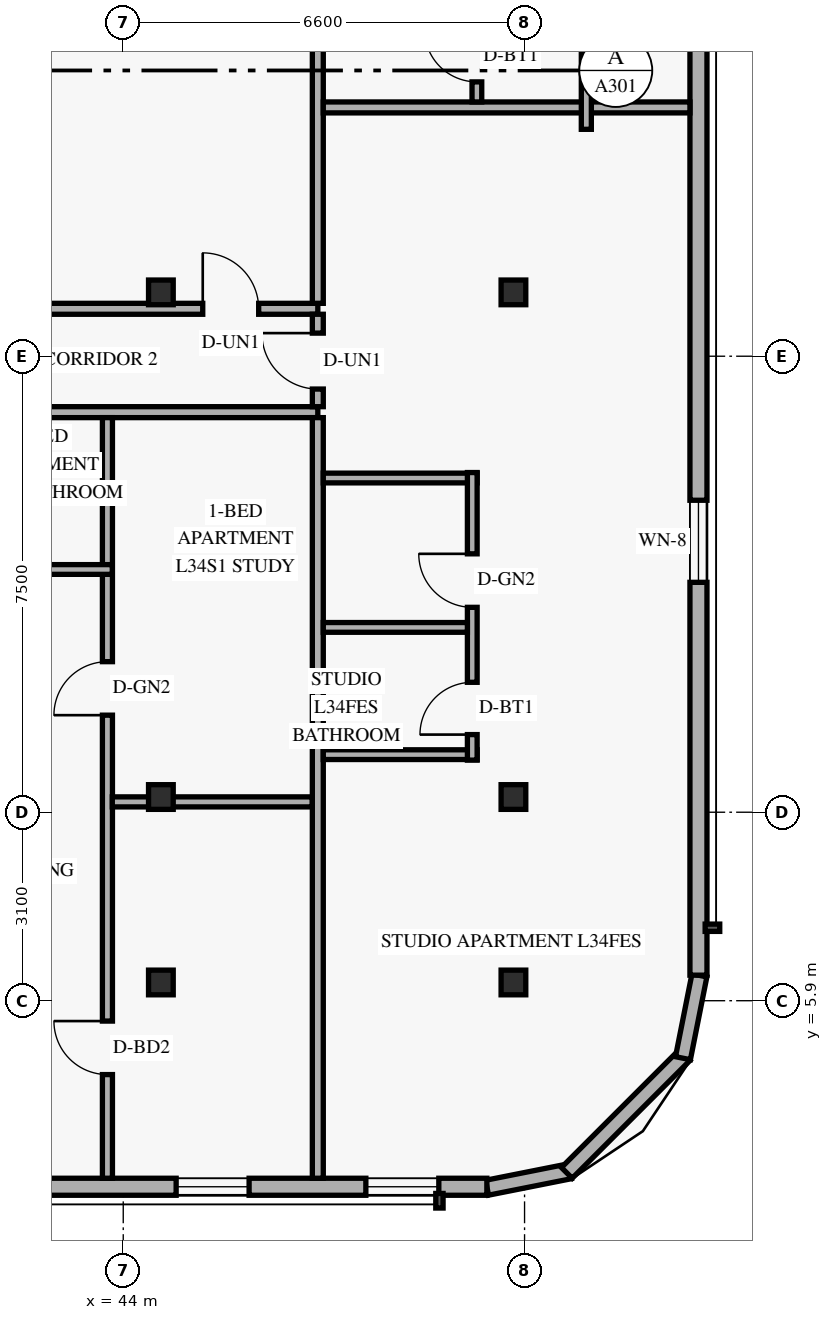
"""IFC4 building model, lengths in metres.
Left out: names, types, materials, properties, quantities, classifications, styles, units other than length and angle.
Written with IfcOpenShell. Run it as: python <this file> out.ifc"""

import sys

from ifc_helpers import new_model, si_unit, direction, frame, frame_2d, origin, origin_2d, place, context, subcontext, project, spatial, rectangle, hollow_rectangle, extrude, element, fill, save


model = new_model("IFC4")
c1 = context("Model", 3, precision=1e-05, world=origin(), true_north=direction((0.0, 1.0)))
c2 = subcontext(c1, "Body", "Model", "MODEL_VIEW")
j1 = project(units=[si_unit("LENGTHUNIT", "METRE"), si_unit("PLANEANGLEUNIT", "RADIAN")], contexts=[c1])
p1 = place(None, origin())
s1 = spatial("IfcSite", under=j1, at=p1, CompositionType="ELEMENT")
p2 = place(p1, origin())
s2 = spatial("IfcBuilding", under=s1, at=p2, CompositionType="ELEMENT")
p3 = place(p2, frame((0.0, 0.0, 132.0)))
s3 = spatial("IfcBuildingStorey", under=s2, at=p3, CompositionType="ELEMENT", Elevation=132.0)
for number, where, z_axis, x_axis in (
    (1, (44.556, 6.2, 0.0), (0.035, 0.0, 0.999), (0.0, 1.0, 0.0)),
    (2, (44.556, 9.25, 0.0), (0.035, 0.0, 0.999), (0.0, 1.0, 0.0)),
    (3, (44.556, 17.55, 0.0), (0.035, 0.0, 0.999), (0.0, 1.0, 0.0)),
):
    element("IfcColumn", number, at=place(p3, frame(where, z_axis=z_axis, x_axis=x_axis)), inside=s3, PredefinedType="COLUMN", context=c2, shape_type="SweptSolid", body=[
        extrude(hollow_rectangle(XDim=0.406, YDim=0.406, WallThickness=0.016, at=origin_2d()), origin(), (0.0, 0.0, 1.0), 3.602),
    ])
for number, where, z_axis, x_axis in (
    (4, (50.313, 6.2, 0.0), (0.058, 0.0, 0.998), (0.0, 1.0, 0.0)),
    (5, (50.313, 9.25, 0.0), (0.058, 0.0, 0.998), (0.0, 1.0, 0.0)),
    (6, (50.313, 17.55, 0.0), (0.058, 0.0, 0.998), (0.0, 1.0, 0.0)),
):
    element("IfcColumn", number, at=place(p3, frame(where, z_axis=z_axis, x_axis=x_axis)), inside=s3, PredefinedType="COLUMN", context=c2, shape_type="SweptSolid", body=[
        extrude(hollow_rectangle(XDim=0.406, YDim=0.406, WallThickness=0.016, at=origin_2d()), origin(), (0.0, 0.0, 1.0), 3.606),
    ])
p4 = place(p3, frame((49.983, 2.824, 0.0), z_axis=(0.0, 0.0, 1.0), x_axis=(0.980809899341, 0.19496651342, 0.0)))
e7 = element("IfcWall", 7, at=p4, inside=s3, PredefinedType="SOLIDWALL", context=c2, shape_type="SweptSolid", body=[
    extrude(rectangle(XDim=1.389, YDim=0.25, at=frame_2d((0.694, 0.0))), origin(), (0.0, 0.0, 1.0), 3.3),
])
p5 = place(p3, frame((51.295, 3.068, 0.0), z_axis=(0.0, 0.0, 1.0), x_axis=(0.707151344399, 0.707062215165, 0.0)))
e8 = element("IfcWall", 8, at=p5, inside=s3, PredefinedType="SOLIDWALL", context=c2, shape_type="SweptSolid", body=[
    extrude(rectangle(XDim=2.739, YDim=0.25, at=frame_2d((1.37, 0.0))), origin(), (0.0, 0.0, 1.0), 3.3),
])
p6 = place(p3, frame((53.205, 4.955, 0.0), z_axis=(0.0, 0.0, 1.0), x_axis=(0.195000137217, 0.980803214965, 0.0)))
e9 = element("IfcWall", 9, at=p6, inside=s3, PredefinedType="SOLIDWALL", context=c2, shape_type="SweptSolid", body=[
    extrude(rectangle(XDim=1.388, YDim=0.25, at=frame_2d((0.694, 0.0))), origin(), (0.0, 0.0, 1.0), 3.3),
])
p7 = place(p3, frame((13.42, 2.84, 0.0), z_axis=(0.0, 0.0, 1.0), x_axis=(1.0, 0.0, 0.0)))
e10 = element("IfcWall", 10, at=p7, inside=s3, PredefinedType="SOLIDWALL", context=c2, shape_type="SweptSolid", body=[
    extrude(rectangle(XDim=36.56, YDim=0.28, at=frame_2d((18.28, 0.0))), origin(), (0.0, 0.0, 1.0), 3.3),
])
p8 = place(p7, frame((4.145, 0.0, 0.85)))
e11 = element("IfcOpeningElement", 11, at=p8, cuts=e10, PredefinedType="OPENING", context=c2, shape_type="SweptSolid", body=[
    extrude(rectangle(XDim=1.2, YDim=1.5, at=frame_2d((0.6, 0.75))), frame((0.0, 0.15, 0.0), z_axis=(0.0, -1.0, 0.0), x_axis=(1.0, 0.0, 0.0)), (0.0, 0.0, 1.0), 0.3),
])
p9 = place(p7, frame((10.005, 0.0, 0.85)))
e12 = element("IfcOpeningElement", 12, at=p9, cuts=e10, PredefinedType="OPENING", context=c2, shape_type="SweptSolid", body=[
    extrude(rectangle(XDim=1.2, YDim=1.5, at=frame_2d((0.6, 0.75))), frame((0.0, 0.15, 0.0), z_axis=(0.0, -1.0, 0.0), x_axis=(1.0, 0.0, 0.0)), (0.0, 0.0, 1.0), 0.3),
])
p10 = place(p7, frame((16.89, 0.0, 0.85)))
e13 = element("IfcOpeningElement", 13, at=p10, cuts=e10, PredefinedType="OPENING", context=c2, shape_type="SweptSolid", body=[
    extrude(rectangle(XDim=1.2, YDim=1.5, at=frame_2d((0.6, 0.75))), frame((0.0, 0.15, 0.0), z_axis=(0.0, -1.0, 0.0), x_axis=(1.0, 0.0, 0.0)), (0.0, 0.0, 1.0), 0.3),
])
p11 = place(p7, frame((22.465, 0.0, 0.85)))
e14 = element("IfcOpeningElement", 14, at=p11, cuts=e10, PredefinedType="OPENING", context=c2, shape_type="SweptSolid", body=[
    extrude(rectangle(XDim=1.2, YDim=1.5, at=frame_2d((0.6, 0.75))), frame((0.0, 0.15, 0.0), z_axis=(0.0, -1.0, 0.0), x_axis=(1.0, 0.0, 0.0)), (0.0, 0.0, 1.0), 0.3),
])
p12 = place(p7, frame((26.625, 0.0, 0.85)))
e15 = element("IfcOpeningElement", 15, at=p12, cuts=e10, PredefinedType="OPENING", context=c2, shape_type="SweptSolid", body=[
    extrude(rectangle(XDim=1.2, YDim=1.5, at=frame_2d((0.6, 0.75))), frame((0.0, 0.15, 0.0), z_axis=(0.0, -1.0, 0.0), x_axis=(1.0, 0.0, 0.0)), (0.0, 0.0, 1.0), 0.3),
])
p13 = place(p7, frame((31.45, 0.0, 0.85)))
e16 = element("IfcOpeningElement", 16, at=p13, cuts=e10, PredefinedType="OPENING", context=c2, shape_type="SweptSolid", body=[
    extrude(rectangle(XDim=1.2, YDim=1.5, at=frame_2d((0.6, 0.75))), frame((0.0, 0.15, 0.0), z_axis=(0.0, -1.0, 0.0), x_axis=(1.0, 0.0, 0.0)), (0.0, 0.0, 1.0), 0.3),
])
p14 = place(p7, frame((34.57, 0.0, 0.85)))
e17 = element("IfcOpeningElement", 17, at=p14, cuts=e10, PredefinedType="OPENING", context=c2, shape_type="SweptSolid", body=[
    extrude(rectangle(XDim=1.2, YDim=1.5, at=frame_2d((0.6, 0.75))), frame((0.0, 0.15, 0.0), z_axis=(0.0, -1.0, 0.0), x_axis=(1.0, 0.0, 0.0)), (0.0, 0.0, 1.0), 0.3),
])
p15 = place(p3, frame((53.46, 6.32, 0.0), z_axis=(0.0, 0.0, 1.0), x_axis=(0.0, 1.0, 0.0)))
e18 = element("IfcWall", 18, at=p15, inside=s3, PredefinedType="SOLIDWALL", context=c2, shape_type="SweptSolid", body=[
    extrude(rectangle(XDim=35.36, YDim=0.28, at=frame_2d((17.68, 0.0))), origin(), (0.0, 0.0, 1.0), 3.3),
])
p16 = place(p15, frame((6.461, 0.0, 0.85)))
e19 = element("IfcOpeningElement", 19, at=p16, cuts=e18, PredefinedType="OPENING", context=c2, shape_type="SweptSolid", body=[
    extrude(rectangle(XDim=1.35, YDim=1.55, at=frame_2d((0.675, 0.775))), frame((0.0, 0.15, 0.0), z_axis=(0.0, -1.0, 0.0), x_axis=(1.0, 0.0, 0.0)), (0.0, 0.0, 1.0), 0.3),
])
p17 = place(p15, frame((16.542, 0.0, 0.85)))
e20 = element("IfcOpeningElement", 20, at=p17, cuts=e18, PredefinedType="OPENING", context=c2, shape_type="SweptSolid", body=[
    extrude(rectangle(XDim=1.35, YDim=1.55, at=frame_2d((0.675, 0.775))), frame((0.0, 0.15, 0.0), z_axis=(0.0, -1.0, 0.0), x_axis=(1.0, 0.0, 0.0)), (0.0, 0.0, 1.0), 0.3),
])
p18 = place(p15, frame((27.086, 0.0, 0.85)))
e21 = element("IfcOpeningElement", 21, at=p18, cuts=e18, PredefinedType="OPENING", context=c2, shape_type="SweptSolid", body=[
    extrude(rectangle(XDim=1.35, YDim=1.55, at=frame_2d((0.675, 0.775))), frame((0.0, 0.15, 0.0), z_axis=(0.0, -1.0, 0.0), x_axis=(1.0, 0.0, 0.0)), (0.0, 0.0, 1.0), 0.3),
])
p19 = place(p3, frame((37.633, 15.58, 0.0), z_axis=(0.0, 0.0, 1.0), x_axis=(1.0, 0.0, 0.0)))
e22 = element("IfcWall", 22, at=p19, inside=s3, PredefinedType="STANDARD", context=c2, shape_type="SweptSolid", body=[
    extrude(rectangle(XDim=9.567, YDim=0.18, at=frame_2d((4.784, 0.0))), origin(), (0.0, 0.0, 1.0), 2.671),
])
p20 = place(p19, frame((0.327, 0.0, 0.0)))
e23 = element("IfcOpeningElement", 23, at=p20, cuts=e22, PredefinedType="OPENING", context=c2, shape_type="SweptSolid", body=[
    extrude(rectangle(XDim=0.92, YDim=2.15, at=frame_2d((0.46, 1.075))), frame((0.0, 0.1, 0.0), z_axis=(0.0, -1.0, 0.0), x_axis=(1.0, 0.0, 0.0)), (0.0, 0.0, 1.0), 0.2),
])
p21 = place(p3, frame((37.64, 17.28, 0.0), z_axis=(0.0, 0.0, 1.0), x_axis=(1.0, 0.0, 0.0)))
e24 = element("IfcWall", 24, at=p21, inside=s3, PredefinedType="STANDARD", context=c2, shape_type="SweptSolid", body=[
    extrude(rectangle(XDim=9.56, YDim=0.18, at=frame_2d((4.78, 0.0))), origin(), (0.0, 0.0, 1.0), 2.671),
])
p22 = place(p21, frame((7.667, 0.0, 0.0)))
e25 = element("IfcOpeningElement", 25, at=p22, cuts=e24, PredefinedType="OPENING", context=c2, shape_type="SweptSolid", body=[
    extrude(rectangle(XDim=0.92, YDim=2.15, at=frame_2d((0.46, 1.075))), frame((0.0, 0.1, 0.0), z_axis=(0.0, -1.0, 0.0), x_axis=(1.0, 0.0, 0.0)), (0.0, 0.0, 1.0), 0.2),
])
p23 = place(p3, frame((43.74, 2.98, 0.0), z_axis=(0.0, 0.0, 1.0), x_axis=(0.0, 1.0, 0.0)))
e26 = element("IfcWall", 26, at=p23, inside=s3, PredefinedType="PARTITIONING", context=c2, shape_type="SweptSolid", body=[
    extrude(rectangle(XDim=12.51, YDim=0.165, at=frame_2d((6.255, 0.0))), origin(), (0.0, 0.0, 1.0), 2.671),
])
p24 = place(p23, frame((1.705, 0.0, 0.0)))
e27 = element("IfcOpeningElement", 27, at=p24, cuts=e26, PredefinedType="OPENING", context=c2, shape_type="SweptSolid", body=[
    extrude(rectangle(XDim=0.88, YDim=2.14, at=frame_2d((0.44, 1.07))), frame((0.0, 0.093, 0.0), z_axis=(0.0, -1.0, 0.0), x_axis=(1.0, 0.0, 0.0)), (0.0, 0.0, 1.0), 0.185),
])
p25 = place(p23, frame((7.616, 0.0, 0.0)))
e28 = element("IfcOpeningElement", 28, at=p25, cuts=e26, PredefinedType="OPENING", context=c2, shape_type="SweptSolid", body=[
    extrude(rectangle(XDim=0.88, YDim=2.12, at=frame_2d((0.44, 1.06))), frame((0.0, 0.093, 0.0), z_axis=(0.0, -1.0, 0.0), x_axis=(1.0, 0.0, 0.0)), (0.0, 0.0, 1.0), 0.185),
])
p26 = place(p3, frame((39.11, 12.992, 0.0), z_axis=(0.0, 0.0, 1.0), x_axis=(1.0, 0.0, 0.0)))
e29 = element("IfcWall", 29, at=p26, inside=s3, PredefinedType="PLUMBINGWALL", context=c2, shape_type="SweptSolid", body=[
    extrude(rectangle(XDim=4.71, YDim=0.16, at=frame_2d((2.355, 0.0))), origin(), (0.0, 0.0, 1.0), 3.3),
])
p27 = place(p26, frame((0.38, 0.0, 0.0)))
e30 = element("IfcOpeningElement", 30, at=p27, cuts=e29, PredefinedType="OPENING", context=c2, shape_type="SweptSolid", body=[
    extrude(rectangle(XDim=0.88, YDim=2.12, at=frame_2d((0.44, 1.06))), frame((0.0, 0.09, 0.0), z_axis=(0.0, -1.0, 0.0), x_axis=(1.0, 0.0, 0.0)), (0.0, 0.0, 1.0), 0.18),
])
p28 = place(p26, frame((2.786, 0.0, 0.0)))
e31 = element("IfcOpeningElement", 31, at=p28, cuts=e29, PredefinedType="OPENING", context=c2, shape_type="SweptSolid", body=[
    extrude(rectangle(XDim=0.86, YDim=2.12, at=frame_2d((0.43, 1.06))), frame((0.0, 0.09, 0.0), z_axis=(0.0, -1.0, 0.0), x_axis=(1.0, 0.0, 0.0)), (0.0, 0.0, 1.0), 0.18),
])
p29 = place(p3, frame((43.82, 9.17, 0.0), z_axis=(0.0, 0.0, 1.0), x_axis=(1.0, 0.0, 0.0)))
e32 = element("IfcWall", 32, at=p29, inside=s3, PredefinedType="PARTITIONING", context=c2, shape_type="SweptSolid", body=[
    extrude(rectangle(XDim=3.29, YDim=0.165, at=frame_2d((1.645, 0.0))), origin(), (0.0, 0.0, 1.0), 2.671),
])
p30 = place(p3, frame((47.2, 15.67, 0.0), z_axis=(0.0, 0.0, 1.0), x_axis=(0.0, 1.0, 0.0)))
e33 = element("IfcWall", 33, at=p30, inside=s3, PredefinedType="STANDARD", context=c2, shape_type="SweptSolid", body=[
    extrude(rectangle(XDim=1.52, YDim=0.18, at=frame_2d((0.76, 0.0))), origin(), (0.0, 0.0, 1.0), 3.3),
])
p31 = place(p30, frame((0.29, 0.0, 0.0)))
e34 = element("IfcOpeningElement", 34, at=p31, cuts=e33, PredefinedType="OPENING", context=c2, shape_type="SweptSolid", body=[
    extrude(rectangle(XDim=0.92, YDim=2.15, at=frame_2d((0.46, 1.075))), frame((0.0, 0.1, 0.0), z_axis=(0.0, -1.0, 0.0), x_axis=(1.0, 0.0, 0.0)), (0.0, 0.0, 1.0), 0.2),
])
p32 = place(p3, frame((47.2, 2.98, 0.0), z_axis=(0.0, 0.0, 1.0), x_axis=(0.0, 1.0, 0.0)))
e35 = element("IfcWall", 35, at=p32, inside=s3, PredefinedType="PARTITIONING", context=c2, shape_type="SweptSolid", body=[
    extrude(rectangle(XDim=12.51, YDim=0.18, at=frame_2d((6.255, 0.0))), origin(), (0.0, 0.0, 1.0), 2.671),
])
p33 = place(p3, frame((47.2, 17.37, 0.0), z_axis=(0.0, 0.0, 1.0), x_axis=(0.0, 1.0, 0.0)))
e36 = element("IfcWall", 36, at=p33, inside=s3, PredefinedType="PARTITIONING", context=c2, shape_type="SweptSolid", body=[
    extrude(rectangle(XDim=10.1, YDim=0.18, at=frame_2d((5.05, 0.0))), origin(), (0.0, 0.0, 1.0), 2.671),
])
p34 = place(p3, frame((47.29, 20.592, 0.0), z_axis=(0.0, 0.0, 1.0), x_axis=(1.0, 0.0, 0.0)))
e37 = element("IfcWall", 37, at=p34, inside=s3, PredefinedType="PARTITIONING", context=c2, shape_type="SweptSolid", body=[
    extrude(rectangle(XDim=6.03, YDim=0.18, at=frame_2d((3.015, 0.0))), origin(), (0.0, 0.0, 1.0), 2.749),
])
for number, where, z_axis, x_axis in (
    (38, (47.29, 9.947, 0.0), (0.0, 0.0, 1.0), (1.0, 0.0, 0.0)),
    (39, (47.29, 14.497, 0.0), (0.0, 0.0, 1.0), (1.0, 0.0, 0.0)),
):
    element("IfcWall", number, at=place(p3, frame(where, z_axis=z_axis, x_axis=x_axis)), inside=s3, PredefinedType="PLUMBINGWALL", context=c2, shape_type="SweptSolid", body=[
        extrude(rectangle(XDim=2.53, YDim=0.16, at=frame_2d((1.265, 0.0))), origin(), (0.0, 0.0, 1.0), 3.3),
    ])
p35 = place(p3, frame((49.74, 9.857, 0.0), z_axis=(0.0, 0.0, 1.0), x_axis=(0.0, 1.0, 0.0)))
e40 = element("IfcWall", 40, at=p35, inside=s3, PredefinedType="PLUMBINGWALL", context=c2, shape_type="SweptSolid", body=[
    extrude(rectangle(XDim=4.73, YDim=0.16, at=frame_2d((2.365, 0.0))), origin(), (0.0, 0.0, 1.0), 2.928),
])
p36 = place(p35, frame((0.42, 0.0, 0.0)))
e41 = element("IfcOpeningElement", 41, at=p36, cuts=e40, PredefinedType="OPENING", context=c2, shape_type="SweptSolid", body=[
    extrude(rectangle(XDim=0.86, YDim=2.12, at=frame_2d((0.43, 1.06))), frame((0.0, 0.09, 0.0), z_axis=(0.0, -1.0, 0.0), x_axis=(1.0, 0.0, 0.0)), (0.0, 0.0, 1.0), 0.18),
])
p37 = place(p35, frame((2.513, 0.0, 0.0)))
e42 = element("IfcOpeningElement", 42, at=p37, cuts=e40, PredefinedType="OPENING", context=c2, shape_type="SweptSolid", body=[
    extrude(rectangle(XDim=0.88, YDim=2.12, at=frame_2d((0.44, 1.06))), frame((0.0, 0.09, 0.0), z_axis=(0.0, -1.0, 0.0), x_axis=(1.0, 0.0, 0.0)), (0.0, 0.0, 1.0), 0.18),
])
p38 = place(p3, frame((47.29, 12.04, 0.0), z_axis=(0.0, 0.0, 1.0), x_axis=(1.0, 0.0, 0.0)))
e43 = element("IfcWall", 43, at=p38, inside=s3, PredefinedType="PLUMBINGWALL", context=c2, shape_type="SweptSolid", body=[
    extrude(rectangle(XDim=2.37, YDim=0.16, at=frame_2d((1.185, 0.0))), origin(), (0.0, 0.0, 1.0), 3.3),
])
p39 = place(p3, frame((49.816, 20.682, 0.0), z_axis=(0.0, 0.0, 1.0), x_axis=(0.0, 1.0, 0.0)))
e44 = element("IfcWall", 44, at=p39, inside=s3, PredefinedType="PLUMBINGWALL", context=c2, shape_type="SweptSolid", body=[
    extrude(rectangle(XDim=4.64, YDim=0.16, at=frame_2d((2.32, 0.0))), origin(), (0.0, 0.0, 1.0), 3.3),
])
p40 = place(p39, frame((0.33, 0.0, 0.0)))
e45 = element("IfcOpeningElement", 45, at=p40, cuts=e44, PredefinedType="OPENING", context=c2, shape_type="SweptSolid", body=[
    extrude(rectangle(XDim=0.86, YDim=2.12, at=frame_2d((0.43, 1.06))), frame((0.0, 0.09, 0.0), z_axis=(0.0, -1.0, 0.0), x_axis=(1.0, 0.0, 0.0)), (0.0, 0.0, 1.0), 0.18),
])
p41 = place(p39, frame((2.423, 0.0, 0.0)))
e46 = element("IfcOpeningElement", 46, at=p41, cuts=e44, PredefinedType="OPENING", context=c2, shape_type="SweptSolid", body=[
    extrude(rectangle(XDim=0.88, YDim=2.12, at=frame_2d((0.44, 1.06))), frame((0.0, 0.09, 0.0), z_axis=(0.0, -1.0, 0.0), x_axis=(1.0, 0.0, 0.0)), (0.0, 0.0, 1.0), 0.18),
])
p42 = place(p3, frame((51.616, 20.232, 0.0), z_axis=(0.0, 0.0, 1.0), x_axis=(0.0, 1.0, 0.0)))
e47 = element("IfcWall", 47, at=p42, inside=s3, PredefinedType="PARTITIONING", context=c2, shape_type="SweptSolid", body=[
    extrude(rectangle(XDim=6.25, YDim=0.165, at=frame_2d((3.125, 0.0))), origin(), (0.0, 0.0, 1.0), 3.3),
])
p43 = place(p13, origin())
e48 = element("IfcWindow", 48, at=p43, inside=s3, PartitioningType="SINGLE_PANEL", PredefinedType="WINDOW", context=c2, shape_type="SweptSolid", body=[
    extrude(rectangle(XDim=1.2, YDim=1.5, at=frame_2d((0.6, 0.75))), frame((0.0, 0.03, 0.0), z_axis=(0.0, -1.0, 0.0), x_axis=(1.0, 0.0, 0.0)), (0.0, 0.0, 1.0), 0.06),
])
fill(e16, e48)
p44 = place(p14, origin())
e49 = element("IfcWindow", 49, at=p44, inside=s3, PartitioningType="SINGLE_PANEL", PredefinedType="WINDOW", context=c2, shape_type="SweptSolid", body=[
    extrude(rectangle(XDim=1.2, YDim=1.5, at=frame_2d((0.6, 0.75))), frame((0.0, 0.03, 0.0), z_axis=(0.0, -1.0, 0.0), x_axis=(1.0, 0.0, 0.0)), (0.0, 0.0, 1.0), 0.06),
])
fill(e17, e49)
p45 = place(p16, origin())
e50 = element("IfcWindow", 50, at=p45, inside=s3, PartitioningType="SINGLE_PANEL", PredefinedType="WINDOW", context=c2, shape_type="SweptSolid", body=[
    extrude(rectangle(XDim=1.35, YDim=1.55, at=frame_2d((0.675, 0.775))), frame((0.0, 0.03, 0.0), z_axis=(0.0, -1.0, 0.0), x_axis=(1.0, 0.0, 0.0)), (0.0, 0.0, 1.0), 0.06),
])
fill(e19, e50)
p46 = place(p24, origin())
e51 = element("IfcDoor", 51, at=p46, inside=s3, OperationType="SINGLE_SWING_RIGHT", PredefinedType="DOOR", context=c2, shape_type="SweptSolid", body=[
    extrude(rectangle(XDim=0.88, YDim=2.14, at=frame_2d((0.44, 1.07))), frame((0.0, 0.025, 0.0), z_axis=(0.0, -1.0, 0.0), x_axis=(1.0, 0.0, 0.0)), (0.0, 0.0, 1.0), 0.05),
])
fill(e27, e51)
p47 = place(p25, origin())
e52 = element("IfcDoor", 52, at=p47, inside=s3, OperationType="SINGLE_SWING_LEFT", PredefinedType="DOOR", context=c2, shape_type="SweptSolid", body=[
    extrude(rectangle(XDim=0.88, YDim=2.12, at=frame_2d((0.44, 1.06))), frame((0.0, 0.025, 0.0), z_axis=(0.0, -1.0, 0.0), x_axis=(1.0, 0.0, 0.0)), (0.0, 0.0, 1.0), 0.05),
])
fill(e28, e52)
p48 = place(p22, origin())
e53 = element("IfcDoor", 53, at=p48, inside=s3, OperationType="SINGLE_SWING_LEFT", PredefinedType="DOOR", context=c2, shape_type="SweptSolid", body=[
    extrude(rectangle(XDim=0.92, YDim=2.15, at=frame_2d((0.46, 1.075))), frame((0.0, 0.025, 0.0), z_axis=(0.0, -1.0, 0.0), x_axis=(1.0, 0.0, 0.0)), (0.0, 0.0, 1.0), 0.05),
])
fill(e25, e53)
p49 = place(p31, origin())
e54 = element("IfcDoor", 54, at=p49, inside=s3, OperationType="SINGLE_SWING_RIGHT", PredefinedType="DOOR", context=c2, shape_type="SweptSolid", body=[
    extrude(rectangle(XDim=0.92, YDim=2.15, at=frame_2d((0.46, 1.075))), frame((0.0, 0.025, 0.0), z_axis=(0.0, -1.0, 0.0), x_axis=(1.0, 0.0, 0.0)), (0.0, 0.0, 1.0), 0.05),
])
fill(e34, e54)
p50 = place(p36, origin())
e55 = element("IfcDoor", 55, at=p50, inside=s3, OperationType="SINGLE_SWING_LEFT", PredefinedType="DOOR", context=c2, shape_type="SweptSolid", body=[
    extrude(rectangle(XDim=0.86, YDim=2.12, at=frame_2d((0.43, 1.06))), frame((0.0, 0.025, 0.0), z_axis=(0.0, -1.0, 0.0), x_axis=(1.0, 0.0, 0.0)), (0.0, 0.0, 1.0), 0.05),
])
fill(e41, e55)
p51 = place(p37, origin())
e56 = element("IfcDoor", 56, at=p51, inside=s3, OperationType="SINGLE_SWING_RIGHT", PredefinedType="DOOR", context=c2, shape_type="SweptSolid", body=[
    extrude(rectangle(XDim=0.88, YDim=2.12, at=frame_2d((0.44, 1.06))), frame((0.0, 0.025, 0.0), z_axis=(0.0, -1.0, 0.0), x_axis=(1.0, 0.0, 0.0)), (0.0, 0.0, 1.0), 0.05),
])
fill(e42, e56)
p52 = place(p40, origin())
e57 = element("IfcDoor", 57, at=p52, inside=s3, OperationType="SINGLE_SWING_RIGHT", PredefinedType="DOOR", context=c2, shape_type="SweptSolid", body=[
    extrude(rectangle(XDim=0.86, YDim=2.12, at=frame_2d((0.43, 1.06))), frame((0.0, 0.025, 0.0), z_axis=(0.0, -1.0, 0.0), x_axis=(1.0, 0.0, 0.0)), (0.0, 0.0, 1.0), 0.05),
])
fill(e45, e57)
save(model, sys.argv[1])
